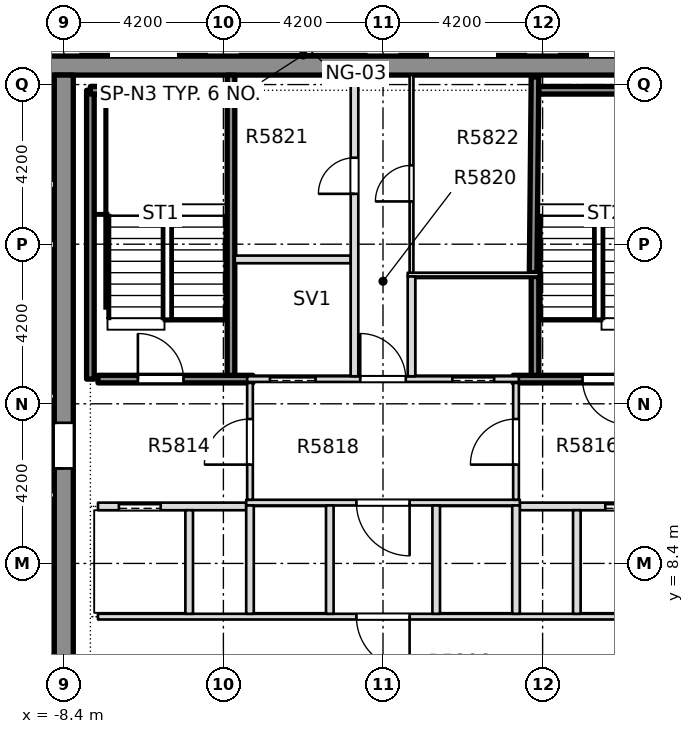
"""IFC4 building model, lengths in metres.
Left out: names, types, materials, properties, quantities, classifications, styles, units other than length and angle.
Written with IfcOpenShell. Run it as: python <this file> out.ifc"""

import sys

from ifc_helpers import new_model, si_unit, direction, frame, frame_2d, origin, place, context, subcontext, project, spatial, rectangle, extrude, element, fill, save


model = new_model("IFC4")
c1 = context("Model", 3, precision=1e-05, world=origin(), true_north=direction((0.0, 1.0)))
c2 = subcontext(c1, "Body", "Model", "MODEL_VIEW")
j1 = project(units=[si_unit("LENGTHUNIT", "METRE"), si_unit("PLANEANGLEUNIT", "RADIAN")], contexts=[c1])
p1 = place(None, origin())
s1 = spatial("IfcSite", under=j1, at=p1, CompositionType="ELEMENT")
p2 = place(p1, origin())
s2 = spatial("IfcBuilding", under=s1, at=p2, CompositionType="ELEMENT")
p3 = place(p2, frame((0.0, 0.0, 223.45)))
s3 = spatial("IfcBuildingStorey", under=s2, at=p3, CompositionType="ELEMENT", Elevation=223.45)
p4 = place(p3, frame((-12.1, 21.5, -0.4), z_axis=(0.0, 0.0, 1.0), x_axis=(1.0, 0.0, 0.0)))
e1 = element("IfcWall", 1, at=p4, inside=s3, PredefinedType="SHEAR", context=c2, shape_type="SweptSolid", body=[
    extrude(rectangle(XDim=24.2, YDim=0.5, at=frame_2d((12.1, 0.0))), origin(), (0.0, 0.0, 1.0), 3.45),
])
p5 = place(p3, frame((-8.4, -7.9, -0.4), z_axis=(0.0, 0.0, 1.0), x_axis=(0.0, 1.0, 0.0)))
e2 = element("IfcWall", 2, at=p5, inside=s3, PredefinedType="SHEAR", context=c2, shape_type="SweptSolid", body=[
    extrude(rectangle(XDim=29.15, YDim=0.5, at=frame_2d((14.575, 0.0))), origin(), (0.0, 0.0, 1.0), 3.45),
])
p6 = place(p5, frame((18.8, 0.0, 0.4)))
e3 = element("IfcOpeningElement", 3, at=p6, cuts=e2, PredefinedType="OPENING", context=c2, shape_type="SweptSolid", body=[
    extrude(rectangle(XDim=1.2, YDim=2.1, at=frame_2d((0.6, 1.05))), frame((0.0, 0.26, 0.0), z_axis=(0.0, -1.0, 0.0), x_axis=(1.0, 0.0, 0.0)), (0.0, 0.0, 1.0), 0.52),
])
p7 = place(p3, frame((-7.5, 7.0, 0.0), z_axis=(0.0, 0.0, 1.0), x_axis=(1.0, 0.0, 0.0)))
e4 = element("IfcWall", 4, at=p7, inside=s3, PredefinedType="PARTITIONING", context=c2, shape_type="SweptSolid", body=[
    extrude(rectangle(XDim=15.0, YDim=0.15, at=frame_2d((7.5, 0.0))), origin(), (0.0, 0.0, 1.0), 3.05),
])
p8 = place(p7, frame((6.8, 0.0, 0.0)))
e5 = element("IfcOpeningElement", 5, at=p8, cuts=e4, PredefinedType="OPENING", context=c2, shape_type="SweptSolid", body=[
    extrude(rectangle(XDim=1.4, YDim=2.1, at=frame_2d((0.7, 1.05))), frame((0.0, 0.085, 0.0), z_axis=(0.0, -1.0, 0.0), x_axis=(1.0, 0.0, 0.0)), (0.0, 0.0, 1.0), 0.17),
])
p9 = place(p3, frame((-7.5, 9.9, 0.0), z_axis=(0.0, 0.0, 1.0), x_axis=(1.0, 0.0, 0.0)))
e6 = element("IfcWall", 6, at=p9, inside=s3, PredefinedType="PARTITIONING", context=c2, shape_type="SweptSolid", body=[
    extrude(rectangle(XDim=3.9, YDim=0.2, at=frame_2d((1.95, 0.0))), origin(), (0.0, 0.0, 1.0), 3.05),
])
p10 = place(p9, frame((0.55, 0.0, 0.0)))
e7 = element("IfcOpeningElement", 7, at=p10, cuts=e6, PredefinedType="OPENING", context=c2, shape_type="SweptSolid", body=[
    extrude(rectangle(XDim=1.1, YDim=2.1, at=frame_2d((0.55, 1.05))), frame((0.0, 0.11, 0.0), z_axis=(0.0, -1.0, 0.0), x_axis=(1.0, 0.0, 0.0)), (0.0, 0.0, 1.0), 0.22),
])
p11 = place(p3, frame((3.6, 9.9, 0.0), z_axis=(0.0, 0.0, 1.0), x_axis=(1.0, 0.0, 0.0)))
e8 = element("IfcWall", 8, at=p11, inside=s3, PredefinedType="PARTITIONING", context=c2, shape_type="SweptSolid", body=[
    extrude(rectangle(XDim=3.9, YDim=0.2, at=frame_2d((1.95, 0.0))), origin(), (0.0, 0.0, 1.0), 3.05),
])
p12 = place(p11, frame((2.25, 0.0, 0.0)))
e9 = element("IfcOpeningElement", 9, at=p12, cuts=e8, PredefinedType="OPENING", context=c2, shape_type="SweptSolid", body=[
    extrude(rectangle(XDim=1.1, YDim=2.1, at=frame_2d((0.55, 1.05))), frame((0.0, 0.11, 0.0), z_axis=(0.0, -1.0, 0.0), x_axis=(1.0, 0.0, 0.0)), (0.0, 0.0, 1.0), 0.22),
])
p13 = place(p3, frame((-3.6, 10.0, 0.0), z_axis=(0.0, 0.0, 1.0), x_axis=(1.0, 0.0, 0.0)))
e10 = element("IfcWall", 10, at=p13, inside=s3, PredefinedType="PARTITIONING", context=c2, shape_type="SweptSolid", body=[
    extrude(rectangle(XDim=7.2, YDim=0.15, at=frame_2d((3.6, 0.0))), origin(), (0.0, 0.0, 1.0), 3.05),
])
p14 = place(p13, frame((2.9, 0.0, 0.0)))
e11 = element("IfcOpeningElement", 11, at=p14, cuts=e10, PredefinedType="OPENING", context=c2, shape_type="SweptSolid", body=[
    extrude(rectangle(XDim=1.4, YDim=2.1, at=frame_2d((0.7, 1.05))), frame((0.0, 0.085, 0.0), z_axis=(0.0, -1.0, 0.0), x_axis=(1.0, 0.0, 0.0)), (0.0, 0.0, 1.0), 0.17),
])
p15 = place(p3, frame((-7.5, 13.25, 0.0), z_axis=(0.0, 0.0, 1.0), x_axis=(1.0, 0.0, 0.0)))
e12 = element("IfcWall", 12, at=p15, inside=s3, PredefinedType="SOLIDWALL", context=c2, shape_type="SweptSolid", body=[
    extrude(rectangle(XDim=4.075, YDim=0.2, at=frame_2d((2.038, 0.0))), origin(), (0.0, 0.0, 1.0), 3.05),
])
p16 = place(p15, frame((1.05, 0.0, 0.0)))
e13 = element("IfcOpeningElement", 13, at=p16, cuts=e12, PredefinedType="OPENING", context=c2, shape_type="SweptSolid", body=[
    extrude(rectangle(XDim=1.2, YDim=2.1, at=frame_2d((0.6, 1.05))), frame((0.0, 0.11, 0.0), z_axis=(0.0, -1.0, 0.0), x_axis=(1.0, 0.0, 0.0)), (0.0, 0.0, 1.0), 0.22),
])
p17 = place(p3, frame((-3.575, 13.25, 0.0), z_axis=(0.0, 0.0, 1.0), x_axis=(1.0, 0.0, 0.0)))
e14 = element("IfcWall", 14, at=p17, inside=s3, PredefinedType="PARTITIONING", context=c2, shape_type="SweptSolid", body=[
    extrude(rectangle(XDim=7.15, YDim=0.15, at=frame_2d((3.575, 0.0))), origin(), (0.0, 0.0, 1.0), 3.05),
])
p18 = place(p17, frame((0.6, 0.0, 0.0)))
e15 = element("IfcOpeningElement", 15, at=p18, cuts=e14, PredefinedType="OPENING", context=c2, shape_type="SweptSolid", body=[
    extrude(rectangle(XDim=1.2, YDim=2.1, at=frame_2d((0.6, 1.05))), frame((0.0, 0.085, 0.0), z_axis=(0.0, -1.0, 0.0), x_axis=(1.0, 0.0, 0.0)), (0.0, 0.0, 1.0), 0.17),
])
p19 = place(p17, frame((5.4, 0.0, 0.0)))
e16 = element("IfcOpeningElement", 16, at=p19, cuts=e14, PredefinedType="OPENING", context=c2, shape_type="SweptSolid", body=[
    extrude(rectangle(XDim=1.1, YDim=2.1, at=frame_2d((0.55, 1.05))), frame((0.0, 0.085, 0.0), z_axis=(0.0, -1.0, 0.0), x_axis=(1.0, 0.0, 0.0)), (0.0, 0.0, 1.0), 0.17),
])
p20 = place(p17, frame((2.975, 0.0, 0.0)))
e17 = element("IfcOpeningElement", 17, at=p20, cuts=e14, PredefinedType="OPENING", context=c2, shape_type="SweptSolid", body=[
    extrude(rectangle(XDim=1.2, YDim=2.1, at=frame_2d((0.6, 1.05))), frame((0.0, 0.085, 0.0), z_axis=(0.0, -1.0, 0.0), x_axis=(1.0, 0.0, 0.0)), (0.0, 0.0, 1.0), 0.17),
])
p21 = place(p3, frame((3.425, 13.25, 0.0), z_axis=(0.0, 0.0, 1.0), x_axis=(1.0, 0.0, 0.0)))
e18 = element("IfcWall", 18, at=p21, inside=s3, PredefinedType="SOLIDWALL", context=c2, shape_type="SweptSolid", body=[
    extrude(rectangle(XDim=4.075, YDim=0.2, at=frame_2d((2.038, 0.0))), origin(), (0.0, 0.0, 1.0), 3.05),
])
p22 = place(p21, frame((1.825, 0.0, 0.0)))
e19 = element("IfcOpeningElement", 19, at=p22, cuts=e18, PredefinedType="OPENING", context=c2, shape_type="SweptSolid", body=[
    extrude(rectangle(XDim=1.2, YDim=2.1, at=frame_2d((0.6, 1.05))), frame((0.0, 0.11, 0.0), z_axis=(0.0, -1.0, 0.0), x_axis=(1.0, 0.0, 0.0)), (0.0, 0.0, 1.0), 0.22),
])
p23 = place(p3, frame((0.65, 16.0, 0.0), z_axis=(0.0, 0.0, 1.0), x_axis=(1.0, 0.0, 0.0)))
e20 = element("IfcWall", 20, at=p23, inside=s3, PredefinedType="PARTITIONING", context=c2, shape_type="SweptSolid", body=[
    extrude(rectangle(XDim=3.45, YDim=0.1, at=frame_2d((1.725, 0.0))), origin(), (0.0, 0.0, 1.0), 3.05),
])
p24 = place(p3, frame((-3.9, 16.4, 0.0), z_axis=(0.0, 0.0, 1.0), x_axis=(1.0, 0.0, 0.0)))
e21 = element("IfcWall", 21, at=p24, inside=s3, PredefinedType="PARTITIONING", context=c2, shape_type="SweptSolid", body=[
    extrude(rectangle(XDim=3.05, YDim=0.2, at=frame_2d((1.525, 0.0))), origin(), (0.0, 0.0, 1.0), 3.05),
])
p25 = place(p3, frame((-5.1, 7.075, 0.0), z_axis=(0.0, 0.0, 1.0), x_axis=(0.0, 1.0, 0.0)))
e22 = element("IfcWall", 22, at=p25, inside=s3, PredefinedType="PARTITIONING", context=c2, shape_type="SweptSolid", body=[
    extrude(rectangle(XDim=2.725, YDim=0.2, at=frame_2d((1.363, 0.0))), origin(), (0.0, 0.0, 1.0), 3.05),
])
p26 = place(p3, frame((-4.0, 13.35, 0.0), z_axis=(0.0, 0.0, 1.0), x_axis=(0.0, 1.0, 0.0)))
e23 = element("IfcWall", 23, at=p26, inside=s3, PredefinedType="SOLIDWALL", context=c2, shape_type="SweptSolid", body=[
    extrude(rectangle(XDim=7.899, YDim=0.2, at=frame_2d((3.949, 0.0))), origin(), (0.0, 0.0, 1.0), 3.05),
])
p27 = place(p3, frame((-3.5, 7.075, 0.0), z_axis=(0.0, 0.0, 1.0), x_axis=(0.0, 1.0, 0.0)))
e24 = element("IfcWall", 24, at=p27, inside=s3, PredefinedType="PARTITIONING", context=c2, shape_type="SweptSolid", body=[
    extrude(rectangle(XDim=2.85, YDim=0.2, at=frame_2d((1.425, 0.0))), origin(), (0.0, 0.0, 1.0), 3.05),
])
p28 = place(p3, frame((-3.5, 10.075, 0.0), z_axis=(0.0, 0.0, 1.0), x_axis=(0.0, 1.0, 0.0)))
e25 = element("IfcWall", 25, at=p28, inside=s3, PredefinedType="PARTITIONING", context=c2, shape_type="SweptSolid", body=[
    extrude(rectangle(XDim=3.075, YDim=0.15, at=frame_2d((1.538, 0.0))), origin(), (0.0, 0.0, 1.0), 3.05),
])
p29 = place(p28, frame((0.925, 0.0, 0.0)))
e26 = element("IfcOpeningElement", 26, at=p29, cuts=e25, PredefinedType="OPENING", context=c2, shape_type="SweptSolid", body=[
    extrude(rectangle(XDim=1.2, YDim=2.1, at=frame_2d((0.6, 1.05))), frame((0.0, 0.085, 0.0), z_axis=(0.0, -1.0, 0.0), x_axis=(1.0, 0.0, 0.0)), (0.0, 0.0, 1.0), 0.17),
])
p30 = place(p3, frame((-1.4, 7.075, 0.0), z_axis=(0.0, 0.0, 1.0), x_axis=(0.0, 1.0, 0.0)))
e27 = element("IfcWall", 27, at=p30, inside=s3, PredefinedType="PARTITIONING", context=c2, shape_type="SweptSolid", body=[
    extrude(rectangle(XDim=2.85, YDim=0.2, at=frame_2d((1.425, 0.0))), origin(), (0.0, 0.0, 1.0), 3.05),
])
p31 = place(p3, frame((-0.75, 13.325, 0.0), z_axis=(0.0, 0.0, 1.0), x_axis=(0.0, 1.0, 0.0)))
e28 = element("IfcWall", 28, at=p31, inside=s3, PredefinedType="PARTITIONING", context=c2, shape_type="SweptSolid", body=[
    extrude(rectangle(XDim=7.924, YDim=0.2, at=frame_2d((3.962, 0.0))), origin(), (0.0, 0.0, 1.0), 3.05),
])
p32 = place(p31, frame((4.8, 0.0, 0.0)))
e29 = element("IfcOpeningElement", 29, at=p32, cuts=e28, PredefinedType="OPENING", context=c2, shape_type="SweptSolid", body=[
    extrude(rectangle(XDim=0.95, YDim=2.1, at=frame_2d((0.475, 1.05))), frame((0.0, 0.11, 0.0), z_axis=(0.0, -1.0, 0.0), x_axis=(1.0, 0.0, 0.0)), (0.0, 0.0, 1.0), 0.22),
])
p33 = place(p3, frame((0.75, 13.325, 0.0), z_axis=(0.0, 0.0, 1.0), x_axis=(0.0, 1.0, 0.0)))
e30 = element("IfcWall", 30, at=p33, inside=s3, PredefinedType="PARTITIONING", context=c2, shape_type="SweptSolid", body=[
    extrude(rectangle(XDim=2.625, YDim=0.2, at=frame_2d((1.312, 0.0))), origin(), (0.0, 0.0, 1.0), 3.05),
])
p34 = place(p3, frame((0.75, 16.05, 0.0), z_axis=(0.0, 0.0, 1.0), x_axis=(0.0, 1.0, 0.0)))
e31 = element("IfcWall", 31, at=p34, inside=s3, PredefinedType="PARTITIONING", context=c2, shape_type="SweptSolid", body=[
    extrude(rectangle(XDim=5.199, YDim=0.1, at=frame_2d((2.6, 0.0))), origin(), (0.0, 0.0, 1.0), 3.05),
])
p35 = place(p34, frame((1.875, 0.0, 0.0)))
e32 = element("IfcOpeningElement", 32, at=p35, cuts=e31, PredefinedType="OPENING", context=c2, shape_type="SweptSolid", body=[
    extrude(rectangle(XDim=0.95, YDim=2.1, at=frame_2d((0.475, 1.05))), frame((0.0, 0.06, 0.0), z_axis=(0.0, -1.0, 0.0), x_axis=(1.0, 0.0, 0.0)), (0.0, 0.0, 1.0), 0.12),
])
for number, where, z_axis, x_axis in (
    (33, (1.4, 7.075, 0.0), (0.0, 0.0, 1.0), (0.0, 1.0, 0.0)),
    (34, (3.5, 7.075, 0.0), (0.0, 0.0, 1.0), (0.0, 1.0, 0.0)),
):
    element("IfcWall", number, at=place(p3, frame(where, z_axis=z_axis, x_axis=x_axis)), inside=s3, PredefinedType="PARTITIONING", context=c2, shape_type="SweptSolid", body=[
        extrude(rectangle(XDim=2.85, YDim=0.2, at=frame_2d((1.425, 0.0))), origin(), (0.0, 0.0, 1.0), 3.05),
    ])
p36 = place(p3, frame((3.5, 10.075, 0.0), z_axis=(0.0, 0.0, 1.0), x_axis=(0.0, 1.0, 0.0)))
e35 = element("IfcWall", 35, at=p36, inside=s3, PredefinedType="PARTITIONING", context=c2, shape_type="SweptSolid", body=[
    extrude(rectangle(XDim=3.075, YDim=0.15, at=frame_2d((1.538, 0.0))), origin(), (0.0, 0.0, 1.0), 3.05),
])
p37 = place(p36, frame((0.925, 0.0, 0.0)))
e36 = element("IfcOpeningElement", 36, at=p37, cuts=e35, PredefinedType="OPENING", context=c2, shape_type="SweptSolid", body=[
    extrude(rectangle(XDim=1.2, YDim=2.1, at=frame_2d((0.6, 1.05))), frame((0.0, 0.085, 0.0), z_axis=(0.0, -1.0, 0.0), x_axis=(1.0, 0.0, 0.0)), (0.0, 0.0, 1.0), 0.17),
])
p38 = place(p3, frame((4.0, 13.35, 0.0), z_axis=(0.0, 0.0, 1.0), x_axis=(0.0, 1.0, 0.0)))
e37 = element("IfcWall", 37, at=p38, inside=s3, PredefinedType="SOLIDWALL", context=c2, shape_type="SweptSolid", body=[
    extrude(rectangle(XDim=2.6, YDim=0.2, at=frame_2d((1.3, 0.0))), origin(), (0.0, 0.0, 1.0), 3.05),
])
p39 = place(p3, frame((3.95, 16.05, 0.0), z_axis=(0.0, 0.0, 1.0), x_axis=(0.009719787395, 0.999952761751, 0.0)))
e38 = element("IfcWall", 38, at=p39, inside=s3, PredefinedType="SOLIDWALL", context=c2, shape_type="SweptSolid", body=[
    extrude(rectangle(XDim=5.149, YDim=0.2, at=frame_2d((2.575, 0.0))), origin(), (0.0, 0.0, 1.0), 3.05),
])
p40 = place(p3, frame((5.1, 7.075, 0.0), z_axis=(0.0, 0.0, 1.0), x_axis=(0.0, 1.0, 0.0)))
e39 = element("IfcWall", 39, at=p40, inside=s3, PredefinedType="PARTITIONING", context=c2, shape_type="SweptSolid", body=[
    extrude(rectangle(XDim=2.725, YDim=0.2, at=frame_2d((1.363, 0.0))), origin(), (0.0, 0.0, 1.0), 3.05),
])
for number, where, z_axis, x_axis in (
    (40, (-12.099, 10.2, 0.0), (0.0, 0.0, 1.0), (1.0, 0.0, 0.0)),
    (41, (-12.099, 12.8, 0.0), (0.0, 0.0, 1.0), (1.0, 0.0, 0.0)),
):
    element("IfcWall", number, at=place(p3, frame(where, z_axis=z_axis, x_axis=x_axis)), inside=s3, PredefinedType="PARTITIONING", context=c2, shape_type="SweptSolid", body=[
        extrude(rectangle(XDim=3.448, YDim=0.15, at=frame_2d((1.724, 0.0))), origin(), (0.0, 0.0, 1.0), 3.05),
    ])
for number, where, z_axis, x_axis in (
    (42, (-12.099, 16.788, 0.0), (0.0, 0.0, 1.0), (1.0, 0.0, 0.0)),
    (43, (-12.099, 18.373, 0.0), (0.0, 0.0, 1.0), (1.0, 0.0, 0.0)),
):
    element("IfcWall", number, at=place(p3, frame(where, z_axis=z_axis, x_axis=x_axis)), inside=s3, PredefinedType="PARTITIONING", context=c2, shape_type="SweptSolid", body=[
        extrude(rectangle(XDim=3.448, YDim=0.2, at=frame_2d((1.724, 0.0))), origin(), (0.0, 0.0, 1.0), 3.05),
    ])
p41 = place(p3, frame((-7.7, 13.25, 0.0), z_axis=(0.0, 0.0, 1.0), x_axis=(0.0, 1.0, 0.0)))
e44 = element("IfcWall", 44, at=p41, inside=s3, PredefinedType="SOLIDWALL", context=c2, shape_type="SweptSolid", body=[
    extrude(rectangle(XDim=7.6, YDim=0.2, at=frame_2d((3.8, 0.0))), origin(), (0.0, 0.0, 1.0), 3.05),
])
p42 = place(p3, frame((-7.7, 20.85, 0.0), z_axis=(0.0, 0.0, 1.0), x_axis=(1.0, 0.0, 0.0)))
e45 = element("IfcWall", 45, at=p42, inside=s3, PredefinedType="SOLIDWALL", context=c2, shape_type="SweptSolid", body=[
    extrude(rectangle(XDim=3.55, YDim=0.2, at=frame_2d((1.775, 0.0))), origin(), (0.0, 0.0, 1.0), 3.05),
])
p43 = place(p3, frame((4.1, 20.85, 0.0), z_axis=(0.0, 0.0, 1.0), x_axis=(1.0, 0.0, 0.0)))
e46 = element("IfcWall", 46, at=p43, inside=s3, PredefinedType="SOLIDWALL", context=c2, shape_type="SweptSolid", body=[
    extrude(rectangle(XDim=3.6, YDim=0.2, at=frame_2d((1.8, 0.0))), origin(), (0.0, 0.0, 1.0), 3.05),
])
p44 = place(p16, origin())
e47 = element("IfcDoor", 47, at=p44, inside=s3, OperationType="SINGLE_SWING_LEFT", PredefinedType="DOOR", context=c2, shape_type="SweptSolid", body=[
    extrude(rectangle(XDim=1.2, YDim=2.1, at=frame_2d((0.6, 1.05))), frame((0.0, 0.025, 0.0), z_axis=(0.0, -1.0, 0.0), x_axis=(1.0, 0.0, 0.0)), (0.0, 0.0, 1.0), 0.05),
])
fill(e13, e47)
p45 = place(p10, origin())
e48 = element("IfcDoor", 48, at=p45, inside=s3, OperationType="SLIDING_TO_RIGHT", PredefinedType="DOOR", context=c2, shape_type="SweptSolid", body=[
    extrude(rectangle(XDim=1.1, YDim=2.1, at=frame_2d((0.55, 1.05))), frame((0.0, 0.025, 0.0), z_axis=(0.0, -1.0, 0.0), x_axis=(1.0, 0.0, 0.0)), (0.0, 0.0, 1.0), 0.05),
])
fill(e7, e48)
p46 = place(p22, origin())
e49 = element("IfcDoor", 49, at=p46, inside=s3, OperationType="SINGLE_SWING_RIGHT", PredefinedType="DOOR", context=c2, shape_type="SweptSolid", body=[
    extrude(rectangle(XDim=1.2, YDim=2.1, at=frame_2d((0.6, 1.05))), frame((0.0, 0.025, 0.0), z_axis=(0.0, -1.0, 0.0), x_axis=(1.0, 0.0, 0.0)), (0.0, 0.0, 1.0), 0.05),
])
fill(e19, e49)
p47 = place(p12, origin())
e50 = element("IfcDoor", 50, at=p47, inside=s3, OperationType="SLIDING_TO_LEFT", PredefinedType="DOOR", context=c2, shape_type="SweptSolid", body=[
    extrude(rectangle(XDim=1.1, YDim=2.1, at=frame_2d((0.55, 1.05))), frame((0.0, 0.025, 0.0), z_axis=(0.0, -1.0, 0.0), x_axis=(1.0, 0.0, 0.0)), (0.0, 0.0, 1.0), 0.05),
])
fill(e9, e50)
p48 = place(p8, origin())
e51 = element("IfcDoor", 51, at=p48, inside=s3, OperationType="SINGLE_SWING_RIGHT", PredefinedType="DOOR", context=c2, shape_type="SweptSolid", body=[
    extrude(rectangle(XDim=1.4, YDim=2.1, at=frame_2d((0.7, 1.05))), frame((0.0, 0.025, 0.0), z_axis=(0.0, -1.0, 0.0), x_axis=(1.0, 0.0, 0.0)), (0.0, 0.0, 1.0), 0.05),
])
fill(e5, e51)
p49 = place(p14, origin())
e52 = element("IfcDoor", 52, at=p49, inside=s3, OperationType="SINGLE_SWING_RIGHT", PredefinedType="DOOR", context=c2, shape_type="SweptSolid", body=[
    extrude(rectangle(XDim=1.4, YDim=2.1, at=frame_2d((0.7, 1.05))), frame((0.0, 0.025, 0.0), z_axis=(0.0, -1.0, 0.0), x_axis=(1.0, 0.0, 0.0)), (0.0, 0.0, 1.0), 0.05),
])
fill(e11, e52)
p50 = place(p18, origin())
e53 = element("IfcDoor", 53, at=p50, inside=s3, OperationType="SLIDING_TO_RIGHT", PredefinedType="DOOR", context=c2, shape_type="SweptSolid", body=[
    extrude(rectangle(XDim=1.2, YDim=2.1, at=frame_2d((0.6, 1.05))), frame((0.0, 0.025, 0.0), z_axis=(0.0, -1.0, 0.0), x_axis=(1.0, 0.0, 0.0)), (0.0, 0.0, 1.0), 0.05),
])
fill(e15, e53)
p51 = place(p19, origin())
e54 = element("IfcDoor", 54, at=p51, inside=s3, OperationType="SLIDING_TO_LEFT", PredefinedType="DOOR", context=c2, shape_type="SweptSolid", body=[
    extrude(rectangle(XDim=1.1, YDim=2.1, at=frame_2d((0.55, 1.05))), frame((0.0, 0.025, 0.0), z_axis=(0.0, -1.0, 0.0), x_axis=(1.0, 0.0, 0.0)), (0.0, 0.0, 1.0), 0.05),
])
fill(e16, e54)
p52 = place(p20, origin())
e55 = element("IfcDoor", 55, at=p52, inside=s3, OperationType="SINGLE_SWING_RIGHT", PredefinedType="DOOR", context=c2, shape_type="SweptSolid", body=[
    extrude(rectangle(XDim=1.2, YDim=2.1, at=frame_2d((0.6, 1.05))), frame((0.0, 0.025, 0.0), z_axis=(0.0, -1.0, 0.0), x_axis=(1.0, 0.0, 0.0)), (0.0, 0.0, 1.0), 0.05),
])
fill(e17, e55)
p53 = place(p32, origin())
e56 = element("IfcDoor", 56, at=p53, inside=s3, OperationType="SINGLE_SWING_RIGHT", PredefinedType="DOOR", context=c2, shape_type="SweptSolid", body=[
    extrude(rectangle(XDim=0.95, YDim=2.1, at=frame_2d((0.475, 1.05))), frame((0.0, 0.025, 0.0), z_axis=(0.0, -1.0, 0.0), x_axis=(1.0, 0.0, 0.0)), (0.0, 0.0, 1.0), 0.05),
])
fill(e29, e56)
p54 = place(p35, origin())
e57 = element("IfcDoor", 57, at=p54, inside=s3, OperationType="SINGLE_SWING_LEFT", PredefinedType="DOOR", context=c2, shape_type="SweptSolid", body=[
    extrude(rectangle(XDim=0.95, YDim=2.1, at=frame_2d((0.475, 1.05))), frame((0.0, 0.025, 0.0), z_axis=(0.0, -1.0, 0.0), x_axis=(1.0, 0.0, 0.0)), (0.0, 0.0, 1.0), 0.05),
])
fill(e32, e57)
p55 = place(p29, origin())
e58 = element("IfcDoor", 58, at=p55, inside=s3, OperationType="SINGLE_SWING_RIGHT", PredefinedType="DOOR", context=c2, shape_type="SweptSolid", body=[
    extrude(rectangle(XDim=1.2, YDim=2.1, at=frame_2d((0.6, 1.05))), frame((0.0, 0.025, 0.0), z_axis=(0.0, -1.0, 0.0), x_axis=(1.0, 0.0, 0.0)), (0.0, 0.0, 1.0), 0.05),
])
fill(e26, e58)
p56 = place(p37, origin())
e59 = element("IfcDoor", 59, at=p56, inside=s3, OperationType="SINGLE_SWING_LEFT", PredefinedType="DOOR", context=c2, shape_type="SweptSolid", body=[
    extrude(rectangle(XDim=1.2, YDim=2.1, at=frame_2d((0.6, 1.05))), frame((0.0, 0.025, 0.0), z_axis=(0.0, -1.0, 0.0), x_axis=(1.0, 0.0, 0.0)), (0.0, 0.0, 1.0), 0.05),
])
fill(e36, e59)
p57 = place(p6, origin())
e60 = element("IfcDoor", 60, at=p57, inside=s3, OperationType="SINGLE_SWING_LEFT", PredefinedType="DOOR", context=c2, shape_type="SweptSolid", body=[
    extrude(rectangle(XDim=1.2, YDim=2.1, at=frame_2d((0.6, 1.05))), frame((0.0, 0.025, 0.0), z_axis=(0.0, -1.0, 0.0), x_axis=(1.0, 0.0, 0.0)), (0.0, 0.0, 1.0), 0.05),
])
fill(e3, e60)
save(model, sys.argv[1])
